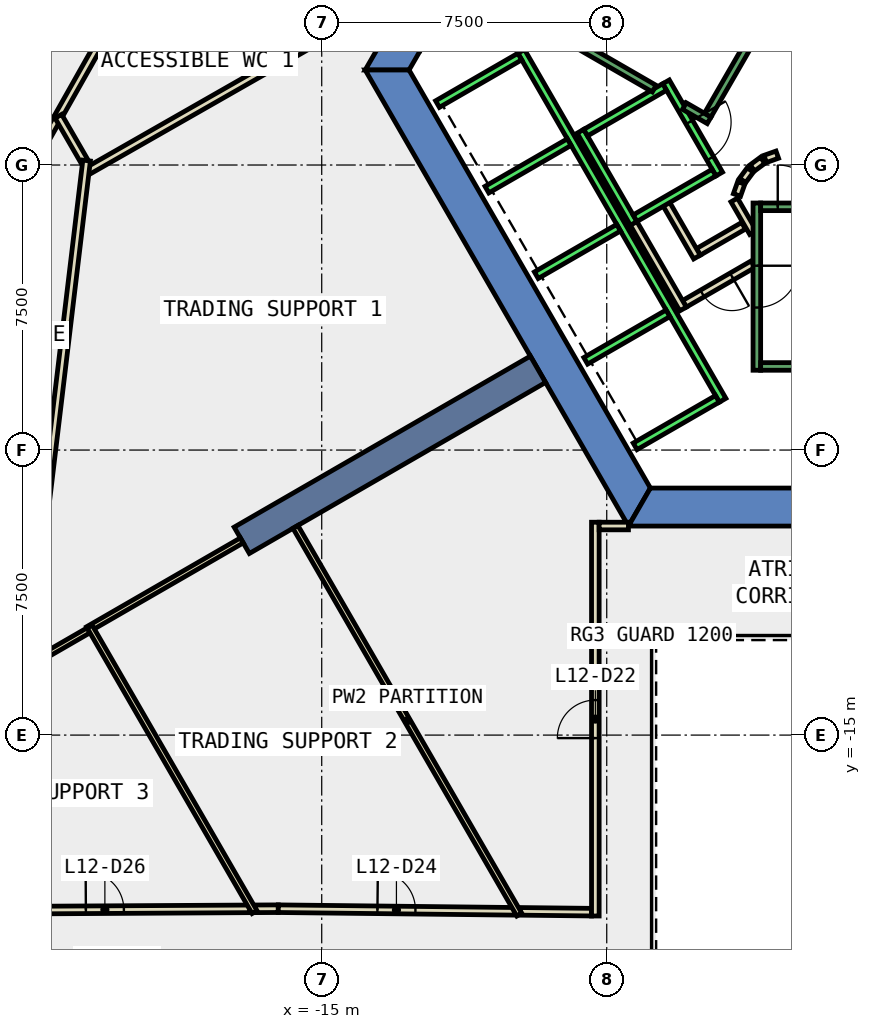
"""IFC4 building model, lengths in metres.
Left out: names, types, materials, properties, quantities, classifications, styles, units other than length and angle.
Written with IfcOpenShell. Run it as: python <this file> out.ifc"""

import sys

from ifc_helpers import new_model, si_unit, direction, frame, frame_2d, origin, place, context, subcontext, project, spatial, polyline, rectangle, outline, extrude, element, fill, save


model = new_model("IFC4")
c1 = context("Model", 3, precision=1e-05, world=origin(), true_north=direction((0.0, 1.0)))
c2 = subcontext(c1, "Body", "Model", "MODEL_VIEW")
j1 = project(units=[si_unit("LENGTHUNIT", "METRE"), si_unit("PLANEANGLEUNIT", "RADIAN")], contexts=[c1])
p1 = place(None, origin())
s1 = spatial("IfcSite", under=j1, at=p1, CompositionType="ELEMENT")
p2 = place(p1, origin())
s2 = spatial("IfcBuilding", under=s1, at=p2, CompositionType="ELEMENT")
p3 = place(p2, frame((0.0, 0.0, 60.2)))
s3 = spatial("IfcBuildingStorey", under=s2, at=p3, CompositionType="ELEMENT", Elevation=60.2)
p4 = place(p3, frame((0.0, 0.0, -0.4)))
e1 = element("IfcWall", 1, at=p4, inside=s3, PredefinedType="SHEAR", context=c2, shape_type="SweptSolid", body=[
    extrude(outline(polyline([(-12.402, 3.02), (-13.267, 3.52), (-13.856, 2.5), (-12.702, 2.5), (-12.402, 3.02)])), origin(), (0.0, 0.0, 1.0), 4.2),
])
p5 = place(p3, frame((0.0, 0.0, -0.4)))
e2 = element("IfcWall", 2, at=p5, inside=s3, PredefinedType="SHEAR", context=c2, shape_type="SweptSolid", body=[
    extrude(outline(polyline([(-13.856, 2.5), (-6.928, -9.5), (-6.351, -8.5), (-12.702, 2.5), (-13.856, 2.5)])), origin(), (0.0, 0.0, 1.0), 4.2),
])
p6 = place(p3, frame((0.0, 0.0, -0.4)))
e3 = element("IfcWall", 3, at=p6, inside=s3, PredefinedType="SHEAR", context=c2, shape_type="SweptSolid", body=[
    extrude(outline(polyline([(3.75, -9.5), (3.75, -8.5), (-6.351, -8.5), (-6.928, -9.5), (3.75, -9.5)])), origin(), (0.0, 0.0, 1.0), 4.2),
])
p7 = place(p3, frame((-9.31, -5.375, -0.4), z_axis=(0.0, 0.0, 1.0), x_axis=(-0.866017533419, -0.500013631625, 0.0)))
e4 = element("IfcWall", 4, at=p7, inside=s3, PredefinedType="SHEAR", context=c2, shape_type="SweptSolid", body=[
    extrude(rectangle(XDim=9.0, YDim=0.8, at=frame_2d((4.5, 0.0))), origin(), (0.0, 0.0, 1.0), 4.2),
])
p8 = place(p3, frame((-18.945, 6.567, 0.0), z_axis=(0.0, 0.0, 1.0), x_axis=(-0.491840751019, -0.87068517596, 0.0)))
e5 = element("IfcWall", 5, at=p8, inside=s3, PredefinedType="PARTITIONING", context=c2, shape_type="SweptSolid", body=[
    extrude(rectangle(XDim=6.168, YDim=0.2, at=frame_2d((3.084, 0.0))), origin(), (0.0, 0.0, 1.0), 3.8),
])
p9 = place(p8, frame((2.584, 0.0, 0.0)))
e6 = element("IfcOpeningElement", 6, at=p9, cuts=e5, PredefinedType="OPENING", context=c2, shape_type="SweptSolid", body=[
    extrude(rectangle(XDim=1.0, YDim=2.1, at=frame_2d((0.5, 1.05))), frame((0.0, 0.11, 0.0), z_axis=(0.0, -1.0, 0.0), x_axis=(1.0, 0.0, 0.0)), (0.0, 0.0, 1.0), 0.22),
])
p10 = place(p3, frame((-9.776, -19.638, 0.0), z_axis=(0.0, 0.0, 1.0), x_axis=(0.999937374473, -0.011191386544, 0.0)))
e7 = element("IfcWall", 7, at=p10, inside=s3, PredefinedType="PARTITIONING", context=c2, shape_type="SweptSolid", body=[
    extrude(rectangle(XDim=1.876, YDim=0.2, at=frame_2d((0.938, 0.0))), origin(), (0.0, 0.0, 1.0), 3.8),
])
p11 = place(p3, frame((-21.979, 1.196, 0.0), z_axis=(0.0, 0.0, 1.0), x_axis=(-0.491617674369, -0.870811151886, 0.0)))
e8 = element("IfcWall", 8, at=p11, inside=s3, PredefinedType="PARTITIONING", context=c2, shape_type="SweptSolid", body=[
    extrude(rectangle(XDim=0.897, YDim=0.2, at=frame_2d((0.448, 0.0))), origin(), (0.0, 0.0, 1.0), 3.8),
])
p12 = place(p3, frame((-16.742, -19.571, 0.0), z_axis=(0.0, 0.0, 1.0), x_axis=(0.999988034534, 0.004891910483, 0.0)))
e9 = element("IfcWall", 9, at=p12, inside=s3, PredefinedType="PARTITIONING", context=c2, shape_type="SweptSolid", body=[
    extrude(rectangle(XDim=0.599, YDim=0.2, at=frame_2d((0.299, 0.0))), origin(), (0.0, 0.0, 1.0), 3.8),
])
p13 = place(p3, frame((-16.143, -19.568, 0.0), z_axis=(0.0, 0.0, 1.0), x_axis=(0.999938688645, -0.011073344206, 0.0)))
e10 = element("IfcWall", 10, at=p13, inside=s3, PredefinedType="PARTITIONING", context=c2, shape_type="SweptSolid", body=[
    extrude(rectangle(XDim=6.218, YDim=0.2, at=frame_2d((3.109, 0.0))), origin(), (0.0, 0.0, 1.0), 3.8),
])
p14 = place(p13, frame((2.609, 0.0, 0.0)))
e11 = element("IfcOpeningElement", 11, at=p14, cuts=e10, PredefinedType="OPENING", context=c2, shape_type="SweptSolid", body=[
    extrude(rectangle(XDim=1.0, YDim=2.1, at=frame_2d((0.5, 1.05))), frame((0.0, 0.11, 0.0), z_axis=(0.0, -1.0, 0.0), x_axis=(1.0, 0.0, 0.0)), (0.0, 0.0, 1.0), 0.22),
])
p15 = place(p3, frame((-24.52, -19.615, 0.0), z_axis=(0.0, 0.0, 1.0), x_axis=(0.999984134574, 0.00563299218, 0.0)))
e12 = element("IfcWall", 12, at=p15, inside=s3, PredefinedType="PARTITIONING", context=c2, shape_type="SweptSolid", body=[
    extrude(rectangle(XDim=7.628, YDim=0.2, at=frame_2d((3.814, 0.0))), origin(), (0.0, 0.0, 1.0), 3.8),
])
p16 = place(p15, frame((3.314, 0.0, 0.0)))
e13 = element("IfcOpeningElement", 13, at=p16, cuts=e12, PredefinedType="OPENING", context=c2, shape_type="SweptSolid", body=[
    extrude(rectangle(XDim=1.0, YDim=2.1, at=frame_2d((0.5, 1.05))), frame((0.0, 0.11, 0.0), z_axis=(0.0, -1.0, 0.0), x_axis=(1.0, 0.0, 0.0)), (0.0, 0.0, 1.0), 0.22),
])
p17 = place(p3, frame((-24.515, 1.585, 0.0), z_axis=(0.0, 0.0, 1.0), x_axis=(0.49174361417, 0.870740040381, 0.0)))
e14 = element("IfcWall", 14, at=p17, inside=s3, PredefinedType="PARTITIONING", context=c2, shape_type="SweptSolid", body=[
    extrude(rectangle(XDim=7.183, YDim=0.2, at=frame_2d((3.591, 0.0))), origin(), (0.0, 0.0, 1.0), 3.8),
])
p18 = place(p17, frame((3.166, 0.0, 0.0)))
e15 = element("IfcOpeningElement", 15, at=p18, cuts=e14, PredefinedType="OPENING", context=c2, shape_type="SweptSolid", body=[
    extrude(rectangle(XDim=1.0, YDim=2.1, at=frame_2d((0.5, 1.05))), frame((0.0, 0.11, 0.0), z_axis=(0.0, -1.0, 0.0), x_axis=(1.0, 0.0, 0.0)), (0.0, 0.0, 1.0), 0.22),
])
p19 = place(p3, frame((-3.9, -1.599, 0.0), z_axis=(0.0, 0.0, 1.0), x_axis=(-0.865969445389, -0.500096910261, 0.0)))
e16 = element("IfcWall", 16, at=p19, inside=s3, PredefinedType="PARTITIONING", context=c2, shape_type="SweptSolid", body=[
    extrude(rectangle(XDim=1.373, YDim=0.2, at=frame_2d((0.687, 0.0))), origin(), (0.0, 0.0, 1.0), 3.8),
])
p20 = place(p3, frame((-5.126, -2.422, 0.0), z_axis=(0.0, 0.0, 1.0), x_axis=(-0.500062241894, 0.865989465428, 0.0)))
e17 = element("IfcWall", 17, at=p20, inside=s3, PredefinedType="PARTITIONING", context=c2, shape_type="SweptSolid", body=[
    extrude(rectangle(XDim=1.7, YDim=0.2, at=frame_2d((0.85, 0.0))), origin(), (0.0, 0.0, 1.0), 3.8),
])
p21 = place(p3, frame((-3.65, -2.61, 0.0), z_axis=(0.0, 0.0, 1.0), x_axis=(-0.866072462134, -0.499918483688, 0.0)))
e18 = element("IfcWall", 18, at=p21, inside=s3, PredefinedType="PARTITIONING", context=c2, shape_type="SweptSolid", body=[
    extrude(rectangle(XDim=2.084, YDim=0.2, at=frame_2d((1.042, 0.0))), origin(), (0.0, 0.0, 1.0), 3.8),
])
p22 = place(p21, frame((0.642, 0.0, 0.0)))
e19 = element("IfcOpeningElement", 19, at=p22, cuts=e18, PredefinedType="OPENING", context=c2, shape_type="SweptSolid", body=[
    extrude(rectangle(XDim=0.9, YDim=2.1, at=frame_2d((0.45, 1.05))), frame((0.0, 0.11, 0.0), z_axis=(0.0, -1.0, 0.0), x_axis=(1.0, 0.0, 0.0)), (0.0, 0.0, 1.0), 0.22),
])
p23 = place(p3, frame((-5.492, -3.788, 0.0), z_axis=(0.0, 0.0, 1.0), x_axis=(-0.500008949224, 0.866020236886, 0.0)))
e20 = element("IfcWall", 20, at=p23, inside=s3, PredefinedType="PARTITIONING", context=c2, shape_type="SweptSolid", body=[
    extrude(rectangle(XDim=2.68, YDim=0.2, at=frame_2d((1.34, 0.0))), origin(), (0.0, 0.0, 1.0), 3.8),
])
p24 = place(p3, frame((-4.145, -0.92, 0.0), z_axis=(0.0, 0.0, 1.0), x_axis=(0.499743786207, -0.866173278362, 0.0)))
e21 = element("IfcWall", 21, at=p24, inside=s3, PredefinedType="PARTITIONING", context=c2, shape_type="SweptSolid", body=[
    extrude(rectangle(XDim=0.991, YDim=0.2, at=frame_2d((0.495, 0.0))), origin(), (0.0, 0.0, 1.0), 3.8),
])
p25 = place(p3, frame((-2.771, 4.7, 0.0), z_axis=(0.0, 0.0, 1.0), x_axis=(0.499969479948, -0.866043023828, 0.0)))
e22 = element("IfcWall", 22, at=p25, inside=s3, PredefinedType="PARTITIONING", context=c2, shape_type="SweptSolid", body=[
    extrude(rectangle(XDim=4.99, YDim=0.2, at=frame_2d((2.495, 0.0))), origin(), (0.0, 0.0, 1.0), 3.8),
])
p26 = place(p25, frame((1.945, 0.0, 0.0)))
e23 = element("IfcOpeningElement", 23, at=p26, cuts=e22, PredefinedType="OPENING", context=c2, shape_type="SweptSolid", body=[
    extrude(rectangle(XDim=1.0, YDim=2.1, at=frame_2d((0.5, 1.05))), frame((0.0, 0.11, 0.0), z_axis=(0.0, -1.0, 0.0), x_axis=(1.0, 0.0, 0.0)), (0.0, 0.0, 1.0), 0.22),
])
p27 = place(p3, frame((-3.012, 0.273, 0.0), z_axis=(0.0, 0.0, 1.0), x_axis=(-0.942280615813, -0.334824194261, 0.0)))
e24 = element("IfcWall", 24, at=p27, inside=s3, PredefinedType="PARTITIONING", context=c2, shape_type="SweptSolid", body=[
    extrude(rectangle(XDim=0.338, YDim=0.2, at=frame_2d((0.169, 0.0))), origin(), (0.0, 0.0, 1.0), 3.8),
])
p28 = place(p3, frame((-3.397, 0.124, 0.0), z_axis=(0.0, 0.0, 1.0), x_axis=(-0.804311165252, -0.594208338422, 0.0)))
e25 = element("IfcWall", 25, at=p28, inside=s3, PredefinedType="PARTITIONING", context=c2, shape_type="SweptSolid", body=[
    extrude(rectangle(XDim=0.338, YDim=0.2, at=frame_2d((0.169, 0.0))), origin(), (0.0, 0.0, 1.0), 3.8),
])
p29 = place(p3, frame((-3.723, -0.131, 0.0), z_axis=(0.0, 0.0, 1.0), x_axis=(-0.594675113454, -0.803966112121, 0.0)))
e26 = element("IfcWall", 26, at=p29, inside=s3, PredefinedType="PARTITIONING", context=c2, shape_type="SweptSolid", body=[
    extrude(rectangle(XDim=0.338, YDim=0.2, at=frame_2d((0.169, 0.0))), origin(), (0.0, 0.0, 1.0), 3.8),
])
p30 = place(p3, frame((-3.96, -0.47, 0.0), z_axis=(0.0, 0.0, 1.0), x_axis=(-0.334824194261, -0.942280615813, 0.0)))
e27 = element("IfcWall", 27, at=p30, inside=s3, PredefinedType="PARTITIONING", context=c2, shape_type="SweptSolid", body=[
    extrude(rectangle(XDim=0.338, YDim=0.2, at=frame_2d((0.169, 0.0))), origin(), (0.0, 0.0, 1.0), 3.8),
])
p31 = place(p3, frame((-7.8, -19.76, 0.0), z_axis=(0.0, 0.0, 1.0), x_axis=(0.0, 1.0, 0.0)))
e28 = element("IfcWall", 28, at=p31, inside=s3, PredefinedType="PARTITIONING", context=c2, shape_type="SweptSolid", body=[
    extrude(rectangle(XDim=10.361, YDim=0.2, at=frame_2d((5.181, 0.0))), origin(), (0.0, 0.0, 1.0), 3.8),
])
p32 = place(p31, frame((4.681, 0.0, 0.0)))
e29 = element("IfcOpeningElement", 29, at=p32, cuts=e28, PredefinedType="OPENING", context=c2, shape_type="SweptSolid", body=[
    extrude(rectangle(XDim=1.0, YDim=2.1, at=frame_2d((0.5, 1.05))), frame((0.0, 0.11, 0.0), z_axis=(0.0, -1.0, 0.0), x_axis=(1.0, 0.0, 0.0)), (0.0, 0.0, 1.0), 0.22),
])
p33 = place(p3, frame((-7.7, -9.499, 0.0), z_axis=(0.0, 0.0, 1.0), x_axis=(1.0, 0.0, 0.0)))
e30 = element("IfcWall", 30, at=p33, inside=s3, PredefinedType="PARTITIONING", context=c2, shape_type="SweptSolid", body=[
    extrude(rectangle(XDim=0.771, YDim=0.2, at=frame_2d((0.385, 0.0))), origin(), (0.0, 0.0, 1.0), 3.8),
])
p34 = place(p3, frame((-14.946, 3.387, 0.0), z_axis=(0.0, 0.0, 1.0), x_axis=(-0.868556003823, -0.4955910292, 0.0)))
e31 = element("IfcWall", 31, at=p34, inside=s3, PredefinedType="PARTITIONING", context=c2, shape_type="SweptSolid", body=[
    extrude(rectangle(XDim=7.199, YDim=0.2, at=frame_2d((3.6, 0.0))), origin(), (0.0, 0.0, 1.0), 3.8),
])
p35 = place(p3, frame((-21.249, 0.105, 0.0), z_axis=(0.0, 0.0, 1.0), x_axis=(-0.500442009317, 0.865770059144, 0.0)))
e32 = element("IfcWall", 32, at=p35, inside=s3, PredefinedType="PARTITIONING", context=c2, shape_type="SweptSolid", body=[
    extrude(rectangle(XDim=1.361, YDim=0.2, at=frame_2d((0.68, 0.0))), origin(), (0.0, 0.0, 1.0), 3.8),
])
p36 = place(p3, frame((-22.403, -10.017, 0.0), z_axis=(0.0, 0.0, 1.0), x_axis=(0.119143334217, 0.992877064853, 0.0)))
e33 = element("IfcWall", 33, at=p36, inside=s3, PredefinedType="PARTITIONING", context=c2, shape_type="SweptSolid", body=[
    extrude(rectangle(XDim=10.207, YDim=0.2, at=frame_2d((5.104, 0.0))), origin(), (0.0, 0.0, 1.0), 3.8),
])
p37 = place(p3, frame((-9.801, -19.724, 0.0), z_axis=(0.0, 0.0, 1.0), x_axis=(-0.500005867738, 0.866022016018, 0.0)))
e34 = element("IfcWall", 34, at=p37, inside=s3, PredefinedType="PARTITIONING", context=c2, shape_type="SweptSolid", body=[
    extrude(rectangle(XDim=11.781, YDim=0.15, at=frame_2d((5.891, 0.0))), origin(), (0.0, 0.0, 1.0), 3.8),
])
p38 = place(p3, frame((-17.103, -9.878, 0.0), z_axis=(0.0, 0.0, 1.0), x_axis=(-0.866013358989, -0.500020861617, 0.0)))
e35 = element("IfcWall", 35, at=p38, inside=s3, PredefinedType="PARTITIONING", context=c2, shape_type="SweptSolid", body=[
    extrude(rectangle(XDim=4.674, YDim=0.15, at=frame_2d((2.337, 0.0))), origin(), (0.0, 0.0, 1.0), 3.8),
])
p39 = place(p3, frame((-21.135, -12.243, 0.0), z_axis=(0.0, 0.0, 1.0), x_axis=(-0.866083439347, -0.499899465982, 0.0)))
e36 = element("IfcWall", 36, at=p39, inside=s3, PredefinedType="PARTITIONING", context=c2, shape_type="SweptSolid", body=[
    extrude(rectangle(XDim=5.691, YDim=0.15, at=frame_2d((2.846, 0.0))), origin(), (0.0, 0.0, 1.0), 3.8),
])
p40 = place(p3, frame((-16.767, -19.658, 0.0), z_axis=(0.0, 0.0, 1.0), x_axis=(-0.500083586486, 0.865977139726, 0.0)))
e37 = element("IfcWall", 37, at=p40, inside=s3, PredefinedType="PARTITIONING", context=c2, shape_type="SweptSolid", body=[
    extrude(rectangle(XDim=8.68, YDim=0.15, at=frame_2d((4.34, 0.0))), origin(), (0.0, 0.0, 1.0), 3.8),
])
p41 = place(p3, frame((-5.94, 2.188, 0.0), z_axis=(0.0, 0.0, 1.0), x_axis=(0.49994636267, -0.866056369097, 0.0)))
e38 = element("IfcWall", 38, at=p41, inside=s3, PredefinedType="STANDARD", context=c2, shape_type="SweptSolid", body=[
    extrude(rectangle(XDim=2.8, YDim=0.2, at=frame_2d((1.4, 0.0))), origin(), (0.0, 0.0, 1.0), 3.8),
])
p42 = place(p41, frame((1.225, 0.0, 0.0)))
e39 = element("IfcOpeningElement", 39, at=p42, cuts=e38, PredefinedType="OPENING", context=c2, shape_type="SweptSolid", body=[
    extrude(rectangle(XDim=1.1, YDim=2.1, at=frame_2d((0.55, 1.05))), frame((0.0, 0.11, 0.0), z_axis=(0.0, -1.0, 0.0), x_axis=(1.0, 0.0, 0.0)), (0.0, 0.0, 1.0), 0.22),
])
p43 = place(p3, frame((-8.192, 0.888, 0.0), z_axis=(0.0, 0.0, 1.0), x_axis=(0.49994636267, -0.866056369097, 0.0)))
e40 = element("IfcWall", 40, at=p43, inside=s3, PredefinedType="STANDARD", context=c2, shape_type="SweptSolid", body=[
    extrude(rectangle(XDim=2.8, YDim=0.2, at=frame_2d((1.4, 0.0))), origin(), (0.0, 0.0, 1.0), 3.8),
])
for number, where, z_axis, x_axis in (
    (41, (-5.977, 2.052, 0.0), (0.0, 0.0, 1.0), (-0.866, -0.5, 0.0)),
    (42, (-4.677, -0.2, 0.0), (0.0, 0.0, 1.0), (-0.866, -0.5, 0.0)),
):
    element("IfcWall", number, at=place(p3, frame(where, z_axis=z_axis, x_axis=x_axis)), inside=s3, PredefinedType="STANDARD", context=c2, shape_type="SweptSolid", body=[
        extrude(rectangle(XDim=2.399, YDim=0.2, at=frame_2d((1.2, 0.0))), origin(), (0.0, 0.0, 1.0), 3.8),
    ])
p44 = place(p3, frame((-9.751, 2.99, 0.0), z_axis=(0.0, 0.0, 1.0), x_axis=(0.50000090737, -0.866024879913, 0.0)))
e43 = element("IfcWall", 43, at=p44, inside=s3, PredefinedType="STANDARD", context=c2, shape_type="SweptSolid", body=[
    extrude(rectangle(XDim=10.6, YDim=0.2, at=frame_2d((5.3, 0.0))), origin(), (0.0, 0.0, 1.0), 3.8),
])
p45 = place(p3, frame((-9.788, 2.853, 0.0), z_axis=(0.0, 0.0, 1.0), x_axis=(-0.865998541277, -0.500046524342, 0.0)))
e44 = element("IfcWall", 44, at=p45, inside=s3, PredefinedType="STANDARD", context=c2, shape_type="SweptSolid", body=[
    extrude(rectangle(XDim=2.5, YDim=0.2, at=frame_2d((1.25, 0.0))), origin(), (0.0, 0.0, 1.0), 3.8),
])
for number, where, z_axis, x_axis in (
    (45, (-8.488, 0.602, 0.0), (0.0, 0.0, 1.0), (-0.866, -0.5, 0.0)),
    (46, (-7.188, -1.65, 0.0), (0.0, 0.0, 1.0), (-0.866, -0.5, 0.0)),
    (47, (-5.888, -3.902, 0.0), (0.0, 0.0, 1.0), (-0.866, -0.5, 0.0)),
    (48, (-4.588, -6.153, 0.0), (0.0, 0.0, 1.0), (-0.866, -0.5, 0.0)),
):
    element("IfcWall", number, at=place(p3, frame(where, z_axis=z_axis, x_axis=x_axis)), inside=s3, PredefinedType="STANDARD", context=c2, shape_type="SweptSolid", body=[
        extrude(rectangle(XDim=2.5, YDim=0.2, at=frame_2d((1.25, 0.0))), origin(), (0.0, 0.0, 1.0), 3.8),
    ])
p46 = place(p3, frame((-3.55, -1.0, 0.0), z_axis=(0.0, 0.0, 1.0), x_axis=(0.0, -1.0, 0.0)))
e49 = element("IfcWall", 49, at=p46, inside=s3, PredefinedType="STANDARD", context=c2, shape_type="SweptSolid", body=[
    extrude(rectangle(XDim=4.4, YDim=0.2, at=frame_2d((2.2, 0.0))), origin(), (0.0, 0.0, 1.0), 3.8),
])
p47 = place(p46, frame((1.65, 0.0, 0.0)))
e50 = element("IfcOpeningElement", 50, at=p47, cuts=e49, PredefinedType="OPENING", context=c2, shape_type="SweptSolid", body=[
    extrude(rectangle(XDim=1.1, YDim=2.2, at=frame_2d((0.55, 1.1))), frame((0.0, 0.11, 0.0), z_axis=(0.0, -1.0, 0.0), x_axis=(1.0, 0.0, 0.0)), (0.0, 0.0, 1.0), 0.22),
])
p48 = place(p3, frame((-3.45, -1.1, 0.0), z_axis=(0.0, 0.0, 1.0), x_axis=(1.0, 0.0, 0.0)))
e51 = element("IfcWall", 51, at=p48, inside=s3, PredefinedType="STANDARD", context=c2, shape_type="SweptSolid", body=[
    extrude(rectangle(XDim=6.9, YDim=0.2, at=frame_2d((3.45, 0.0))), origin(), (0.0, 0.0, 1.0), 3.8),
])
p49 = place(p48, frame((0.45, 0.0, 0.0)))
e52 = element("IfcOpeningElement", 52, at=p49, cuts=e51, PredefinedType="OPENING", context=c2, shape_type="SweptSolid", body=[
    extrude(rectangle(XDim=1.1, YDim=2.2, at=frame_2d((0.55, 1.1))), frame((0.0, 0.11, 0.0), z_axis=(0.0, -1.0, 0.0), x_axis=(1.0, 0.0, 0.0)), (0.0, 0.0, 1.0), 0.22),
])
p50 = place(p3, frame((-3.45, -5.3, 0.0), z_axis=(0.0, 0.0, 1.0), x_axis=(1.0, 0.0, 0.0)))
e53 = element("IfcWall", 53, at=p50, inside=s3, PredefinedType="STANDARD", context=c2, shape_type="SweptSolid", body=[
    extrude(rectangle(XDim=6.9, YDim=0.2, at=frame_2d((3.45, 0.0))), origin(), (0.0, 0.0, 1.0), 3.8),
])
p51 = place(p3, frame((-6.25, 2.01, 0.0), z_axis=(0.0, 0.0, 1.0), x_axis=(-0.86611865017, 0.499838457731, 0.0)))
e54 = element("IfcWall", 54, at=p51, inside=s3, PredefinedType="STANDARD", context=c2, shape_type="SweptSolid", body=[
    extrude(rectangle(XDim=2.733, YDim=0.2, at=frame_2d((1.366, 0.0))), origin(), (0.0, 0.0, 1.0), 3.8),
])
p52 = place(p3, frame((-4.806, 1.176, 0.0), z_axis=(0.0, 0.0, 1.0), x_axis=(-0.866558586415, 0.499075361355, 0.0)))
e55 = element("IfcWall", 55, at=p52, inside=s3, PredefinedType="STANDARD", context=c2, shape_type="SweptSolid", body=[
    extrude(rectangle(XDim=0.751, YDim=0.2, at=frame_2d((0.376, 0.0))), origin(), (0.0, 0.0, 1.0), 3.8),
])
p53 = place(p3, frame((-1.393, 7.288, 0.0), z_axis=(0.0, 0.0, 1.0), x_axis=(-0.499963383562, -0.866046543262, 0.0)))
e56 = element("IfcWall", 56, at=p53, inside=s3, PredefinedType="STANDARD", context=c2, shape_type="SweptSolid", body=[
    extrude(rectangle(XDim=6.9, YDim=0.2, at=frame_2d((3.45, 0.0))), origin(), (0.0, 0.0, 1.0), 3.8),
])
p54 = place(p53, frame((0.45, 0.0, 0.0)))
e57 = element("IfcOpeningElement", 57, at=p54, cuts=e56, PredefinedType="OPENING", context=c2, shape_type="SweptSolid", body=[
    extrude(rectangle(XDim=1.1, YDim=2.2, at=frame_2d((0.55, 1.1))), frame((0.0, 0.11, 0.0), z_axis=(0.0, -1.0, 0.0), x_axis=(1.0, 0.0, 0.0)), (0.0, 0.0, 1.0), 0.22),
])
p55 = place(p32, origin())
e58 = element("IfcDoor", 58, at=p55, inside=s3, OperationType="SINGLE_SWING_LEFT", PredefinedType="DOOR", context=c2, shape_type="SweptSolid", body=[
    extrude(rectangle(XDim=1.0, YDim=2.1, at=frame_2d((0.5, 1.05))), frame((0.0, 0.025, 0.0), z_axis=(0.0, -1.0, 0.0), x_axis=(1.0, 0.0, 0.0)), (0.0, 0.0, 1.0), 0.05),
])
fill(e29, e58)
p56 = place(p14, origin())
e59 = element("IfcDoor", 59, at=p56, inside=s3, OperationType="SINGLE_SWING_LEFT", PredefinedType="DOOR", context=c2, shape_type="SweptSolid", body=[
    extrude(rectangle(XDim=1.0, YDim=2.1, at=frame_2d((0.5, 1.05))), frame((0.0, 0.025, 0.0), z_axis=(0.0, -1.0, 0.0), x_axis=(1.0, 0.0, 0.0)), (0.0, 0.0, 1.0), 0.05),
])
fill(e11, e59)
p57 = place(p16, origin())
e60 = element("IfcDoor", 60, at=p57, inside=s3, OperationType="SINGLE_SWING_LEFT", PredefinedType="DOOR", context=c2, shape_type="SweptSolid", body=[
    extrude(rectangle(XDim=1.0, YDim=2.1, at=frame_2d((0.5, 1.05))), frame((0.0, 0.025, 0.0), z_axis=(0.0, -1.0, 0.0), x_axis=(1.0, 0.0, 0.0)), (0.0, 0.0, 1.0), 0.05),
])
fill(e13, e60)
p58 = place(p22, origin())
e61 = element("IfcDoor", 61, at=p58, inside=s3, OperationType="SINGLE_SWING_LEFT", PredefinedType="DOOR", context=c2, shape_type="SweptSolid", body=[
    extrude(rectangle(XDim=0.9, YDim=2.1, at=frame_2d((0.45, 1.05))), frame((0.0, 0.025, 0.0), z_axis=(0.0, -1.0, 0.0), x_axis=(1.0, 0.0, 0.0)), (0.0, 0.0, 1.0), 0.05),
])
fill(e19, e61)
p59 = place(p42, origin())
e62 = element("IfcDoor", 62, at=p59, inside=s3, OperationType="SLIDING_TO_LEFT", PredefinedType="DOOR", context=c2, shape_type="SweptSolid", body=[
    extrude(rectangle(XDim=1.1, YDim=2.1, at=frame_2d((0.55, 1.05))), frame((0.0, 0.025, 0.0), z_axis=(0.0, -1.0, 0.0), x_axis=(1.0, 0.0, 0.0)), (0.0, 0.0, 1.0), 0.05),
])
fill(e39, e62)
p60 = place(p49, origin())
e63 = element("IfcDoor", 63, at=p60, inside=s3, OperationType="SINGLE_SWING_LEFT", PredefinedType="DOOR", context=c2, shape_type="SweptSolid", body=[
    extrude(rectangle(XDim=1.1, YDim=2.2, at=frame_2d((0.55, 1.1))), frame((0.0, 0.025, 0.0), z_axis=(0.0, -1.0, 0.0), x_axis=(1.0, 0.0, 0.0)), (0.0, 0.0, 1.0), 0.05),
])
fill(e52, e63)
p61 = place(p47, origin())
e64 = element("IfcDoor", 64, at=p61, inside=s3, OperationType="SINGLE_SWING_LEFT", PredefinedType="DOOR", context=c2, shape_type="SweptSolid", body=[
    extrude(rectangle(XDim=1.1, YDim=2.2, at=frame_2d((0.55, 1.1))), frame((0.0, 0.025, 0.0), z_axis=(0.0, -1.0, 0.0), x_axis=(1.0, 0.0, 0.0)), (0.0, 0.0, 1.0), 0.05),
])
fill(e50, e64)
save(model, sys.argv[1])
